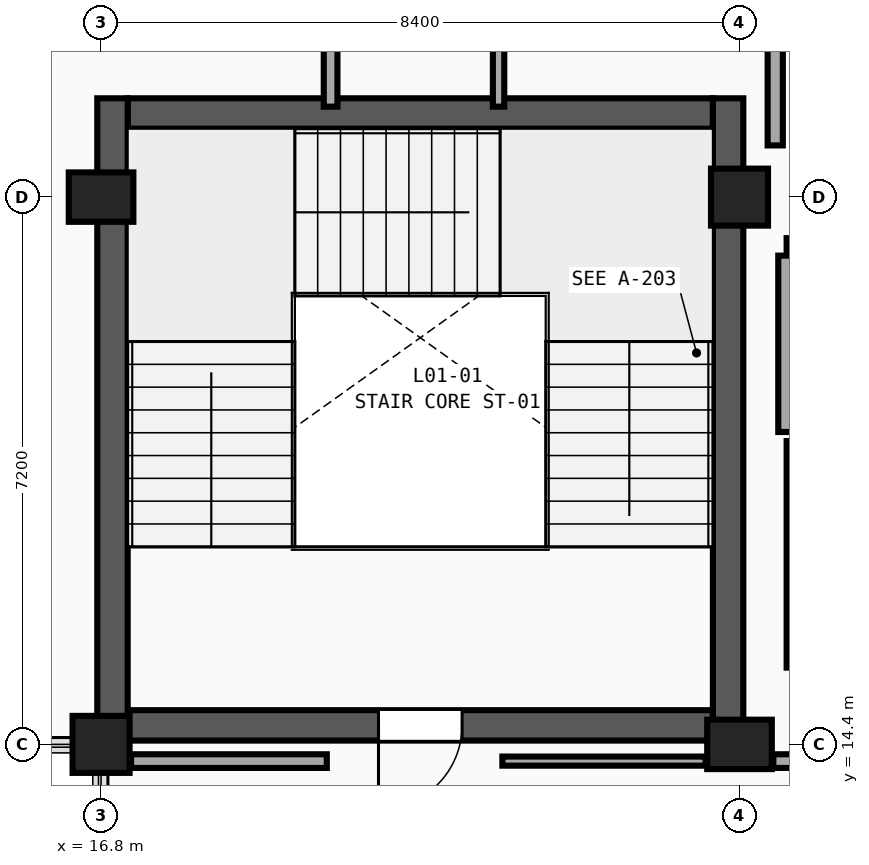
"""IFC4 building model, lengths in metres.
Left out: names, types, materials, properties, quantities, classifications, styles, units other than length and angle.
Written with IfcOpenShell. Run it as: python <this file> out.ifc"""

import sys

from ifc_helpers import new_model, si_unit, direction, frame, frame_2d, origin, origin_2d, place, context, subcontext, project, spatial, rectangle, extrude, element, fill, save


model = new_model("IFC4")
c1 = context("Model", 3, precision=1e-05, world=origin(), true_north=direction((0.0, 1.0)))
c2 = subcontext(c1, "Body", "Model", "MODEL_VIEW")
j1 = project(units=[si_unit("LENGTHUNIT", "METRE"), si_unit("PLANEANGLEUNIT", "RADIAN")], contexts=[c1])
p1 = place(None, origin())
s1 = spatial("IfcSite", under=j1, at=p1, CompositionType="ELEMENT")
p2 = place(p1, origin())
s2 = spatial("IfcBuilding", under=s1, at=p2, CompositionType="ELEMENT")
p3 = place(p2, frame((0.0, 0.0, 5.4)))
s3 = spatial("IfcBuildingStorey", under=s2, at=p3, CompositionType="ELEMENT", Elevation=5.4)
p4 = place(p3, frame((16.8, 14.4, 0.0), z_axis=(0.0, 0.0, 1.0), x_axis=(1.0, 0.0, 0.0)))
e1 = element("IfcColumn", 1, at=p4, inside=s3, PredefinedType="COLUMN", context=c2, shape_type="SweptSolid", body=[
    extrude(rectangle(XDim=0.75, YDim=0.75, at=origin_2d()), origin(), (0.0, 0.0, 1.0), 4.5),
])
for number, where, z_axis, x_axis in (
    (2, (16.8, 21.6, 0.0), (0.0, 0.0, 1.0), (1.0, 0.0, 0.0)),
    (3, (25.2, 14.4, 0.0), (0.0, 0.0, 1.0), (1.0, 0.0, 0.0)),
):
    element("IfcColumn", number, at=place(p3, frame(where, z_axis=z_axis, x_axis=x_axis)), inside=s3, PredefinedType="COLUMN", context=c2, shape_type="SweptSolid", body=[
        extrude(rectangle(XDim=0.85, YDim=0.65, at=origin_2d()), origin(), (0.0, 0.0, 1.0), 4.5),
    ])
p5 = place(p3, frame((25.2, 21.6, 0.0), z_axis=(0.0, 0.0, 1.0), x_axis=(1.0, 0.0, 0.0)))
e4 = element("IfcColumn", 4, at=p5, inside=s3, PredefinedType="COLUMN", context=c2, shape_type="SweptSolid", body=[
    extrude(rectangle(XDim=0.75, YDim=0.75, at=origin_2d()), origin(), (0.0, 0.0, 1.0), 4.5),
])
p6 = place(p3, frame((24.85, 14.65, 0.0), z_axis=(0.0, 0.0, 1.0), x_axis=(-1.0, 0.0, 0.0)))
e5 = element("IfcWall", 5, at=p6, inside=s3, PredefinedType="SHEAR", context=c2, shape_type="SweptSolid", body=[
    extrude(rectangle(XDim=7.7, YDim=0.4, at=frame_2d((3.85, 0.0))), origin(), (0.0, 0.0, 1.0), 4.5),
])
p7 = place(p6, frame((3.3, 0.0, 0.0)))
e6 = element("IfcOpeningElement", 6, at=p7, cuts=e5, PredefinedType="OPENING", context=c2, shape_type="SweptSolid", body=[
    extrude(rectangle(XDim=1.1, YDim=2.2, at=frame_2d((0.55, 1.1))), frame((0.0, 0.22, 0.0), z_axis=(0.0, -1.0, 0.0), x_axis=(1.0, 0.0, 0.0)), (0.0, 0.0, 1.0), 0.44),
])
p8 = place(p3, frame((17.15, 22.7, 0.0), z_axis=(0.0, 0.0, 1.0), x_axis=(1.0, 0.0, 0.0)))
e7 = element("IfcWall", 7, at=p8, inside=s3, PredefinedType="SHEAR", context=c2, shape_type="SweptSolid", body=[
    extrude(rectangle(XDim=7.7, YDim=0.4, at=frame_2d((3.85, 0.0))), origin(), (0.0, 0.0, 1.0), 4.5),
])
for number, where, z_axis, x_axis in (
    (8, (16.95, 22.9, 0.0), (0.0, 0.0, 1.0), (0.0, -1.0, 0.0)),
    (9, (25.05, 14.45, 0.0), (0.0, 0.0, 1.0), (0.0, 1.0, 0.0)),
):
    element("IfcWall", number, at=place(p3, frame(where, z_axis=z_axis, x_axis=x_axis)), inside=s3, PredefinedType="SHEAR", context=c2, shape_type="SweptSolid", body=[
        extrude(rectangle(XDim=8.45, YDim=0.4, at=frame_2d((4.225, 0.0))), origin(), (0.0, 0.0, 1.0), 4.5),
    ])
p9 = place(p3, frame((25.94, 18.39, 0.0), z_axis=(0.0, 0.0, 1.0), x_axis=(0.0, -1.0, 0.0)))
e10 = element("IfcWall", 10, at=p9, inside=s3, PredefinedType="SHEAR", context=c2, shape_type="SweptSolid", body=[
    extrude(rectangle(XDim=2.98, YDim=0.24, at=frame_2d((1.49, 0.0))), origin(), (0.0, 0.0, 1.0), 4.18),
])
p10 = place(p3, frame((25.82, 20.95, 0.0), z_axis=(0.0, 0.0, 1.0), x_axis=(1.0, 0.0, 0.0)))
e11 = element("IfcWall", 11, at=p10, inside=s3, PredefinedType="SOLIDWALL", context=c2, shape_type="SweptSolid", body=[
    extrude(rectangle(XDim=2.54, YDim=0.22, at=frame_2d((1.27, 0.0))), origin(), (0.0, 0.0, 1.0), 3.73),
])
p11 = place(p10, frame((0.745, 0.0, 0.0)))
e12 = element("IfcOpeningElement", 12, at=p11, cuts=e11, PredefinedType="OPENING", context=c2, shape_type="SweptSolid", body=[
    extrude(rectangle(XDim=1.05, YDim=2.15, at=frame_2d((0.525, 1.075))), frame((0.0, 0.13, 0.0), z_axis=(0.0, -1.0, 0.0), x_axis=(1.0, 0.0, 0.0)), (0.0, 0.0, 1.0), 0.26),
])
p12 = place(p3, frame((25.82, 18.51, 0.0), z_axis=(0.0, 0.0, 1.0), x_axis=(0.0, 1.0, 0.0)))
e13 = element("IfcWall", 13, at=p12, inside=s3, PredefinedType="SOLIDWALL", context=c2, shape_type="SweptSolid", body=[
    extrude(rectangle(XDim=2.32, YDim=0.22, at=frame_2d((1.16, 0.0))), origin(), (0.0, 0.0, 1.0), 4.18),
])
p13 = place(p3, frame((22.08, 14.18, 0.0), z_axis=(0.0, 0.0, 1.0), x_axis=(1.0, 0.0, 0.0)))
e14 = element("IfcWall", 14, at=p13, inside=s3, PredefinedType="PARTITIONING", context=c2, shape_type="SweptSolid", body=[
    extrude(rectangle(XDim=2.675, YDim=0.12, at=frame_2d((1.337, 0.0))), origin(), (0.0, 0.0, 1.0), 3.73),
])
p14 = place(p3, frame((25.645, 14.18, 0.0), z_axis=(0.0, 0.0, 1.0), x_axis=(1.0, 0.0, 0.0)))
e15 = element("IfcWall", 15, at=p14, inside=s3, PredefinedType="PARTITIONING", context=c2, shape_type="SweptSolid", body=[
    extrude(rectangle(XDim=7.56, YDim=0.18, at=frame_2d((3.78, 0.0))), origin(), (0.0, 0.0, 1.0), 3.73),
])
p15 = place(p14, frame((3.26, 0.0, 0.0)))
e16 = element("IfcOpeningElement", 16, at=p15, cuts=e15, PredefinedType="OPENING", context=c2, shape_type="SweptSolid", body=[
    extrude(rectangle(XDim=1.04, YDim=2.45, at=frame_2d((0.52, 1.225))), frame((0.0, 0.11, 0.0), z_axis=(0.0, -1.0, 0.0), x_axis=(1.0, 0.0, 0.0)), (0.0, 0.0, 1.0), 0.22),
])
p16 = place(p3, frame((17.195, 14.18, 0.0), z_axis=(0.0, 0.0, 1.0), x_axis=(1.0, 0.0, 0.0)))
e17 = element("IfcWall", 17, at=p16, inside=s3, PredefinedType="PARTITIONING", context=c2, shape_type="SweptSolid", body=[
    extrude(rectangle(XDim=2.575, YDim=0.18, at=frame_2d((1.288, 0.0))), origin(), (0.0, 0.0, 1.0), 3.73),
])
p17 = place(p3, frame((22.03, 22.79, 0.0), z_axis=(0.0, 0.0, 1.0), x_axis=(0.0, 1.0, 0.0)))
e18 = element("IfcWall", 18, at=p17, inside=s3, PredefinedType="PARTITIONING", context=c2, shape_type="SweptSolid", body=[
    extrude(rectangle(XDim=2.23, YDim=0.15, at=frame_2d((1.115, 0.0))), origin(), (0.0, 0.0, 1.0), 4.18),
])
p18 = place(p3, frame((19.82, 22.79, 0.0), z_axis=(0.0, 0.0, 1.0), x_axis=(0.0, 1.0, 0.0)))
e19 = element("IfcWall", 19, at=p18, inside=s3, PredefinedType="PARTITIONING", context=c2, shape_type="SweptSolid", body=[
    extrude(rectangle(XDim=2.07, YDim=0.18, at=frame_2d((1.035, 0.0))), origin(), (0.0, 0.0, 1.0), 4.18),
])
p19 = place(p3, frame((25.67, 22.28, 0.0), z_axis=(0.0, 0.0, 1.0), x_axis=(0.0, 1.0, 0.0)))
e20 = element("IfcWall", 20, at=p19, inside=s3, PredefinedType="PLUMBINGWALL", context=c2, shape_type="SweptSolid", body=[
    extrude(rectangle(XDim=2.59, YDim=0.2, at=frame_2d((1.295, 0.0))), origin(), (0.0, 0.0, 1.0), 4.18),
])
p20 = place(p7, origin())
e21 = element("IfcDoor", 21, at=p20, inside=s3, OperationType="SINGLE_SWING_RIGHT", PredefinedType="DOOR", context=c2, shape_type="SweptSolid", body=[
    extrude(rectangle(XDim=1.1, YDim=2.2, at=frame_2d((0.55, 1.1))), frame((0.0, 0.025, 0.0), z_axis=(0.0, -1.0, 0.0), x_axis=(1.0, 0.0, 0.0)), (0.0, 0.0, 1.0), 0.05),
])
fill(e6, e21)
save(model, sys.argv[1])
